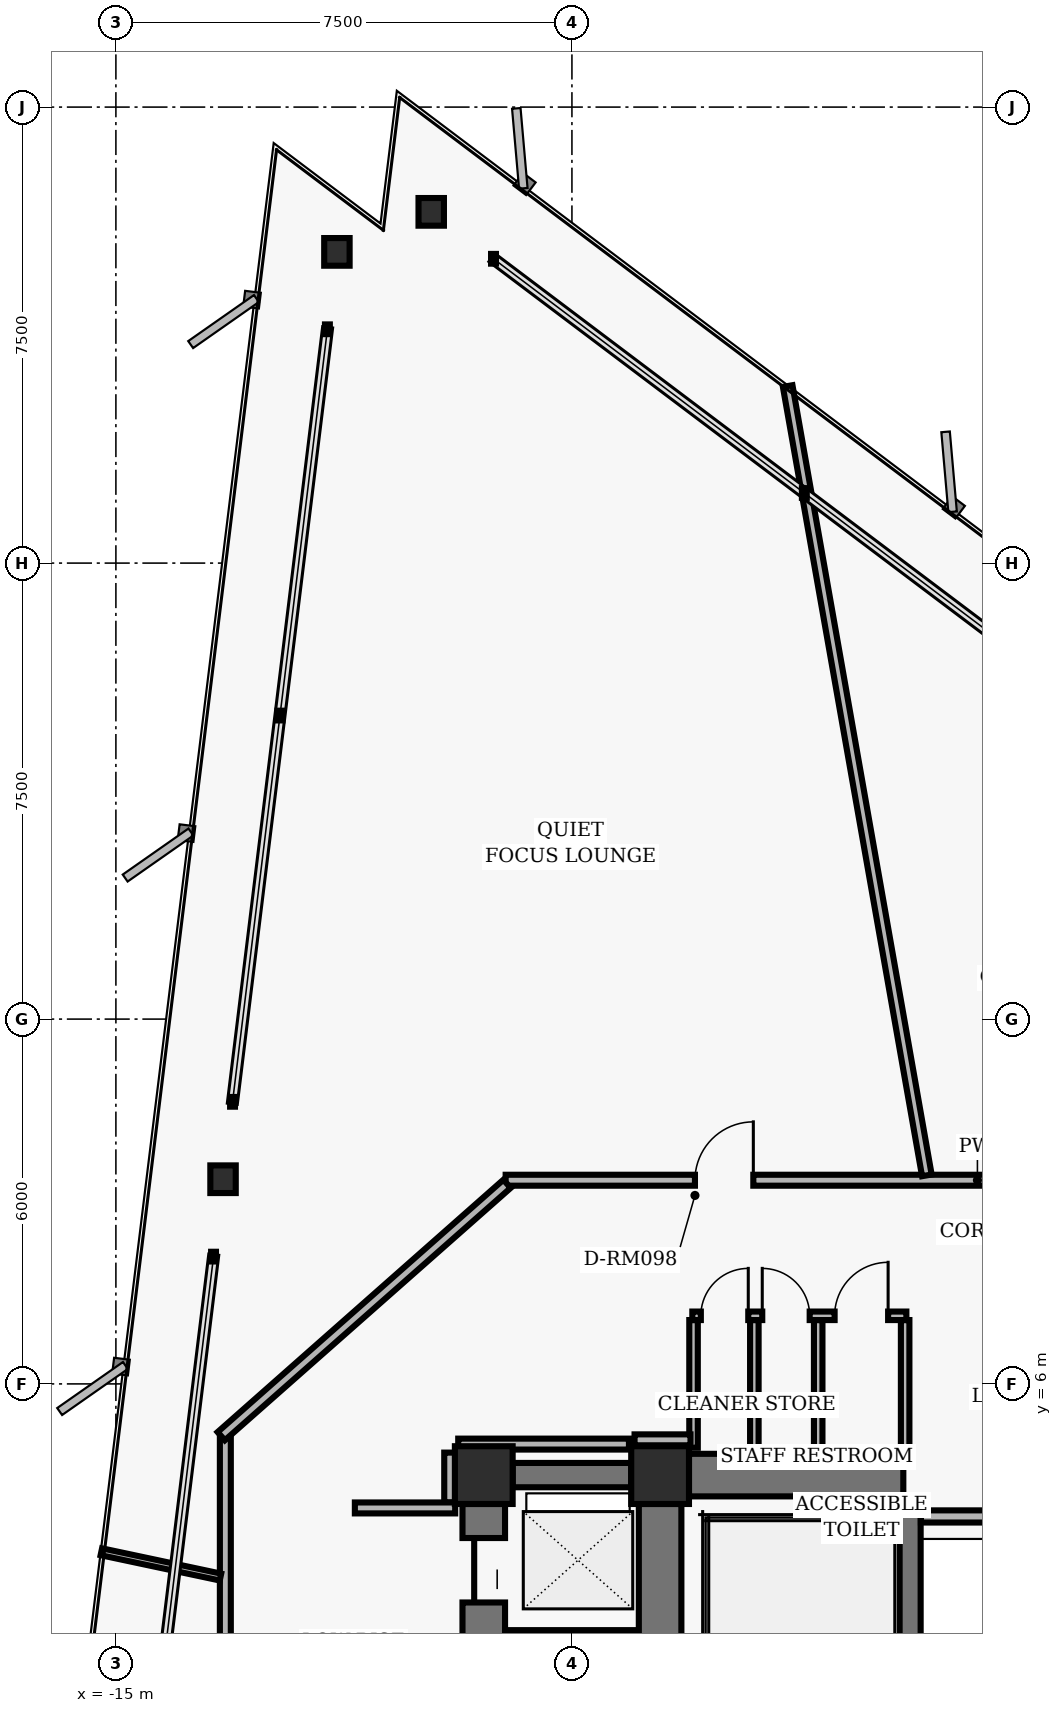
"""IFC4 building model, lengths in metres.
Left out: names, types, materials, properties, quantities, classifications, styles, units other than length and angle.
Written with IfcOpenShell. Run it as: python <this file> out.ifc"""

import sys

from ifc_helpers import new_model, si_unit, direction, frame, frame_2d, origin, origin_2d, place, context, subcontext, project, spatial, rectangle, hollow_rectangle, i_section, extrude, element, fill, save


model = new_model("IFC4")
c1 = context("Model", 3, precision=1e-05, world=origin(), true_north=direction((0.0, 1.0)))
c2 = subcontext(c1, "Body", "Model", "MODEL_VIEW")
j1 = project(units=[si_unit("LENGTHUNIT", "METRE"), si_unit("PLANEANGLEUNIT", "RADIAN")], contexts=[c1])
p1 = place(None, origin())
s1 = spatial("IfcSite", under=j1, at=p1, CompositionType="ELEMENT")
p2 = place(p1, origin())
s2 = spatial("IfcBuilding", under=s1, at=p2, CompositionType="ELEMENT")
p3 = place(p2, frame((0.0, 0.0, 69.76)))
s3 = spatial("IfcBuildingStorey", under=s2, at=p3, CompositionType="ELEMENT", Elevation=69.76)
for number, where, z_axis, x_axis in (
    (1, (-6.05, 4.5, 0.0), (0.0, 0.0, 1.0), (1.0, 0.0, 0.0)),
    (2, (-8.95, 4.5, 0.0), (0.0, 0.0, 1.0), (1.0, 0.0, 0.0)),
):
    element("IfcColumn", number, at=place(p3, frame(where, z_axis=z_axis, x_axis=x_axis)), inside=s3, PredefinedType="COLUMN", context=c2, shape_type="SweptSolid", body=[
        extrude(hollow_rectangle(XDim=0.95, YDim=0.95, WallThickness=0.06, InnerFilletRadius=0.02, OuterFilletRadius=0.04, at=origin_2d()), origin(), (0.0, 0.0, 1.0), 3.36),
    ])
p4 = place(p3, frame((-6.05, 0.475, 0.0), z_axis=(0.0, 0.0, 1.0), x_axis=(0.0, 1.0, 0.0)))
e3 = element("IfcWall", 3, at=p4, inside=s3, PredefinedType="SHEAR", context=c2, shape_type="SweptSolid", body=[
    extrude(rectangle(XDim=3.55, YDim=0.7, at=frame_2d((1.775, 0.0))), origin(), (0.0, 0.0, 1.0), 3.098),
])
p5 = place(p3, frame((-1.94, -4.1, 0.0), z_axis=(0.0, 0.0, 1.0), x_axis=(0.0, 1.0, 0.0)))
e4 = element("IfcWall", 4, at=p5, inside=s3, PredefinedType="SHEAR", context=c2, shape_type="SweptSolid", body=[
    extrude(rectangle(XDim=8.2, YDim=0.35, at=frame_2d((4.1, 0.0))), origin(), (0.0, 0.0, 1.0), 3.098),
])
p6 = place(p3, frame((-5.575, 4.5, 0.0), z_axis=(0.0, 0.0, 1.0), x_axis=(1.0, 0.0, 0.0)))
e5 = element("IfcWall", 5, at=p6, inside=s3, PredefinedType="SHEAR", context=c2, shape_type="SweptSolid", body=[
    extrude(rectangle(XDim=3.525, YDim=0.7, at=frame_2d((1.762, 0.0))), origin(), (0.0, 0.0, 1.0), 3.098),
])
p7 = place(p3, frame((-8.95, -3.825, 0.0), z_axis=(0.0, 0.0, 1.0), x_axis=(0.0, 1.0, 0.0)))
e6 = element("IfcWall", 6, at=p7, inside=s3, PredefinedType="SHEAR", context=c2, shape_type="SweptSolid", body=[
    extrude(rectangle(XDim=7.85, YDim=0.7, at=frame_2d((3.925, 0.0))), origin(), (0.0, 0.0, 1.0), 3.098),
])
p8 = place(p7, frame((0.55, 0.0, 0.0)))
e7 = element("IfcOpeningElement", 7, at=p8, cuts=e6, PredefinedType="OPENING", context=c2, shape_type="SweptSolid", body=[
    extrude(rectangle(XDim=1.06, YDim=2.04, at=frame_2d((0.53, 1.02))), frame((0.0, 0.36, 0.0), z_axis=(0.0, -1.0, 0.0), x_axis=(1.0, 0.0, 0.0)), (0.0, 0.0, 1.0), 0.72),
])
p9 = place(p7, frame((3.395, 0.0, 0.0)))
e8 = element("IfcOpeningElement", 8, at=p9, cuts=e6, PredefinedType="OPENING", context=c2, shape_type="SweptSolid", body=[
    extrude(rectangle(XDim=1.06, YDim=2.04, at=frame_2d((0.53, 1.02))), frame((0.0, 0.36, 0.0), z_axis=(0.0, -1.0, 0.0), x_axis=(1.0, 0.0, 0.0)), (0.0, 0.0, 1.0), 0.72),
])
p10 = place(p7, frame((6.23, 0.0, 0.0)))
e9 = element("IfcOpeningElement", 9, at=p10, cuts=e6, PredefinedType="OPENING", context=c2, shape_type="SweptSolid", body=[
    extrude(rectangle(XDim=1.06, YDim=2.04, at=frame_2d((0.53, 1.02))), frame((0.0, 0.36, 0.0), z_axis=(0.0, -1.0, 0.0), x_axis=(1.0, 0.0, 0.0)), (0.0, 0.0, 1.0), 0.72),
])
p11 = place(p3, frame((-8.475, 4.5, 0.0), z_axis=(0.0, 0.0, 1.0), x_axis=(1.0, 0.0, 0.0)))
e10 = element("IfcWall", 10, at=p11, inside=s3, PredefinedType="SHEAR", context=c2, shape_type="SweptSolid", body=[
    extrude(rectangle(XDim=1.95, YDim=0.4, at=frame_2d((0.975, 0.0))), origin(), (0.0, 0.0, 1.0), 3.098),
])
for number, where, z_axis, x_axis in (
    (11, (-9.814, 25.277, 0.0), (0.0, 0.0, 1.0), (1.0, 0.0, 0.0)),
    (12, (-11.365, 24.619, 0.0), (0.0, 0.0, 1.0), (1.0, 0.0, 0.0)),
    (13, (-13.238, 9.366, 0.0), (0.0, 0.0, 1.0), (1.0, 0.0, 0.0)),
):
    element("IfcColumn", number, at=place(p3, frame(where, z_axis=z_axis, x_axis=x_axis)), inside=s3, PredefinedType="COLUMN", context=c2, shape_type="SweptSolid", body=[
        extrude(i_section(OverallWidth=0.418, OverallDepth=0.455, WebThickness=0.042, FlangeThickness=0.068, FilletRadius=0.025, at=origin_2d()), origin(), (0.0, 0.0, 1.0), 3.36),
    ])
p12 = place(p3, frame((-1.76, 3.82, 0.0), z_axis=(0.0, 0.0, 1.0), x_axis=(1.0, 0.0, 0.0)))
e14 = element("IfcWall", 14, at=p12, inside=s3, PredefinedType="PARTITIONING", context=c2, shape_type="SweptSolid", body=[
    extrude(rectangle(XDim=3.52, YDim=0.2, at=frame_2d((1.76, 0.0))), origin(), (0.0, 0.0, 1.0), 3.073),
])
for number, where, z_axis, x_axis in (
    (15, (-5.5, 4.95, 0.0), (0.0, 0.0, 1.0), (0.0, 1.0, 0.0)),
    (16, (-4.5, 4.95, 0.0), (0.0, 0.0, 1.0), (0.0, 1.0, 0.0)),
    (17, (-3.45, 4.95, 0.0), (0.0, 0.0, 1.0), (0.0, 1.0, 0.0)),
    (18, (-2.02, 4.95, 0.0), (0.0, 0.0, 1.0), (0.0, 1.0, 0.0)),
):
    element("IfcWall", number, at=place(p3, frame(where, z_axis=z_axis, x_axis=x_axis)), inside=s3, PredefinedType="PARTITIONING", context=c2, shape_type="SweptSolid", body=[
        extrude(rectangle(XDim=2.1, YDim=0.14, at=frame_2d((1.05, 0.0))), origin(), (0.0, 0.0, 1.0), 3.073),
    ])
p13 = place(p3, frame((-5.52, 7.12, 0.0), z_axis=(0.0, 0.0, 1.0), x_axis=(1.0, 0.0, 0.0)))
e19 = element("IfcWall", 19, at=p13, inside=s3, PredefinedType="PARTITIONING", context=c2, shape_type="SweptSolid", body=[
    extrude(rectangle(XDim=3.52, YDim=0.14, at=frame_2d((1.76, 0.0))), origin(), (0.0, 0.0, 1.0), 3.073),
])
p14 = place(p13, frame((0.14, 0.0, 0.0)))
e20 = element("IfcOpeningElement", 20, at=p14, cuts=e19, PredefinedType="OPENING", context=c2, shape_type="SweptSolid", body=[
    extrude(rectangle(XDim=0.78, YDim=2.01, at=frame_2d((0.39, 1.005))), frame((0.0, 0.08, 0.0), z_axis=(0.0, -1.0, 0.0), x_axis=(1.0, 0.0, 0.0)), (0.0, 0.0, 1.0), 0.16),
])
p15 = place(p13, frame((1.15, 0.0, 0.0)))
e21 = element("IfcOpeningElement", 21, at=p15, cuts=e19, PredefinedType="OPENING", context=c2, shape_type="SweptSolid", body=[
    extrude(rectangle(XDim=0.78, YDim=2.01, at=frame_2d((0.39, 1.005))), frame((0.0, 0.08, 0.0), z_axis=(0.0, -1.0, 0.0), x_axis=(1.0, 0.0, 0.0)), (0.0, 0.0, 1.0), 0.16),
])
p16 = place(p13, frame((2.34, 0.0, 0.0)))
e22 = element("IfcOpeningElement", 22, at=p16, cuts=e19, PredefinedType="OPENING", context=c2, shape_type="SweptSolid", body=[
    extrude(rectangle(XDim=0.88, YDim=2.02, at=frame_2d((0.44, 1.01))), frame((0.0, 0.08, 0.0), z_axis=(0.0, -1.0, 0.0), x_axis=(1.0, 0.0, 0.0)), (0.0, 0.0, 1.0), 0.16),
])
p17 = place(p3, frame((-8.55, 1.85, 0.0), z_axis=(0.0, 0.0, 1.0), x_axis=(1.0, 0.0, 0.0)))
e23 = element("IfcWall", 23, at=p17, inside=s3, PredefinedType="PARTITIONING", context=c2, shape_type="SweptSolid", body=[
    extrude(rectangle(XDim=2.1, YDim=0.2, at=frame_2d((1.05, 0.0))), origin(), (0.0, 0.0, 1.0), 3.073),
])
p18 = place(p3, frame((-8.59, 9.35, 0.0), z_axis=(0.0, 0.0, 1.0), x_axis=(1.0, 0.0, 0.0)))
e24 = element("IfcWall", 24, at=p18, inside=s3, PredefinedType="PARTITIONING", context=c2, shape_type="SweptSolid", body=[
    extrude(rectangle(XDim=17.18, YDim=0.18, at=frame_2d((8.59, 0.0))), origin(), (0.0, 0.0, 1.0), 3.073),
])
p19 = place(p18, frame((11.444, 0.0, 0.0)))
e25 = element("IfcOpeningElement", 25, at=p19, cuts=e24, PredefinedType="OPENING", context=c2, shape_type="SweptSolid", body=[
    extrude(rectangle(XDim=0.96, YDim=2.02, at=frame_2d((0.48, 1.01))), frame((0.0, 0.1, 0.0), z_axis=(0.0, -1.0, 0.0), x_axis=(1.0, 0.0, 0.0)), (0.0, 0.0, 1.0), 0.2),
])
p20 = place(p18, frame((3.113, 0.0, 0.0)))
e26 = element("IfcOpeningElement", 26, at=p20, cuts=e24, PredefinedType="OPENING", context=c2, shape_type="SweptSolid", body=[
    extrude(rectangle(XDim=0.96, YDim=2.02, at=frame_2d((0.48, 1.01))), frame((0.0, 0.1, 0.0), z_axis=(0.0, -1.0, 0.0), x_axis=(1.0, 0.0, 0.0)), (0.0, 0.0, 1.0), 0.2),
])
p21 = place(p3, frame((-13.2, -5.11, 0.0), z_axis=(0.0, 0.0, 1.0), x_axis=(0.0, 1.0, 0.0)))
e27 = element("IfcWall", 27, at=p21, inside=s3, PredefinedType="PARTITIONING", context=c2, shape_type="SweptSolid", body=[
    extrude(rectangle(XDim=10.22, YDim=0.18, at=frame_2d((5.11, 0.0))), origin(), (0.0, 0.0, 1.0), 2.587),
])
p22 = place(p21, frame((3.616, 0.0, 0.0)))
e28 = element("IfcOpeningElement", 28, at=p22, cuts=e27, PredefinedType="OPENING", context=c2, shape_type="SweptSolid", body=[
    extrude(rectangle(XDim=0.96, YDim=2.02, at=frame_2d((0.48, 1.01))), frame((0.0, 0.1, 0.0), z_axis=(0.0, -1.0, 0.0), x_axis=(1.0, 0.0, 0.0)), (0.0, 0.0, 1.0), 0.2),
])
p23 = place(p3, frame((-13.268, 5.14, 0.0), z_axis=(0.0, 0.0, 1.0), x_axis=(0.749626463267, 0.66186113768, 0.0)))
e29 = element("IfcWall", 29, at=p23, inside=s3, PredefinedType="PARTITIONING", context=c2, shape_type="SweptSolid", body=[
    extrude(rectangle(XDim=6.27, YDim=0.18, at=frame_2d((3.135, 0.0))), origin(), (0.0, 0.0, 1.0), 3.073),
])
p24 = place(p3, frame((-9.51, 4.87, 0.0), z_axis=(0.0, 0.0, 1.0), x_axis=(0.0, -1.0, 0.0)))
e30 = element("IfcWall", 30, at=p24, inside=s3, PredefinedType="PARTITIONING", context=c2, shape_type="SweptSolid", body=[
    extrude(rectangle(XDim=0.82, YDim=0.18, at=frame_2d((0.41, 0.0))), origin(), (0.0, 0.0, 1.0), 3.073),
])
p25 = place(p3, frame((-9.42, 3.96, 0.0), z_axis=(0.0, 0.0, 1.0), x_axis=(-1.0, 0.0, 0.0)))
e31 = element("IfcWall", 31, at=p25, inside=s3, PredefinedType="PARTITIONING", context=c2, shape_type="SweptSolid", body=[
    extrude(rectangle(XDim=1.65, YDim=0.18, at=frame_2d((0.825, 0.0))), origin(), (0.0, 0.0, 1.0), 3.073),
])
p26 = place(p3, frame((-5.55, 5.08, 0.0), z_axis=(0.0, 0.0, 1.0), x_axis=(-1.0, 0.0, 0.0)))
e32 = element("IfcWall", 32, at=p26, inside=s3, PredefinedType="PARTITIONING", context=c2, shape_type="SweptSolid", body=[
    extrude(rectangle(XDim=0.92, YDim=0.18, at=frame_2d((0.46, 0.0))), origin(), (0.0, 0.0, 1.0), 3.073),
])
p27 = place(p3, frame((-6.562, 5.01, 0.0), z_axis=(0.0, 0.0, 1.0), x_axis=(-1.0, 0.0, 0.0)))
e33 = element("IfcWall", 33, at=p27, inside=s3, PredefinedType="PARTITIONING", context=c2, shape_type="SweptSolid", body=[
    extrude(rectangle(XDim=2.808, YDim=0.18, at=frame_2d((1.404, 0.0))), origin(), (0.0, 0.0, 1.0), 3.073),
])
p28 = place(p3, frame((-1.663, 9.43, 0.0), z_axis=(0.0, 0.0, 1.0), x_axis=(-0.17364798238, 0.984807787446, 0.0)))
e34 = element("IfcWall", 34, at=p28, inside=s3, PredefinedType="PARTITIONING", context=c2, shape_type="SweptSolid", body=[
    extrude(rectangle(XDim=13.182, YDim=0.16, at=frame_2d((6.591, 0.0))), origin(), (0.0, 0.0, 1.0), 3.073),
])
p29 = place(p3, frame((-13.28, 2.823, 0.0), z_axis=(0.0, 0.0, 1.0), x_axis=(-0.978147079353, 0.207914143705, 0.0)))
e35 = element("IfcWall", 35, at=p29, inside=s3, PredefinedType="MOVABLE", context=c2, shape_type="SweptSolid", body=[
    extrude(rectangle(XDim=2.003, YDim=0.115, at=frame_2d((1.001, 0.0))), origin(), (0.0, 0.0, 1.0), 3.073),
])
p30 = place(p14, origin())
e36 = element("IfcDoor", 36, at=p30, inside=s3, OperationType="SINGLE_SWING_RIGHT", PredefinedType="DOOR", context=c2, shape_type="SweptSolid", body=[
    extrude(rectangle(XDim=0.78, YDim=2.01, at=frame_2d((0.39, 1.005))), frame((0.0, 0.025, 0.0), z_axis=(0.0, -1.0, 0.0), x_axis=(1.0, 0.0, 0.0)), (0.0, 0.0, 1.0), 0.05),
])
fill(e20, e36)
p31 = place(p15, origin())
e37 = element("IfcDoor", 37, at=p31, inside=s3, OperationType="SINGLE_SWING_LEFT", PredefinedType="DOOR", context=c2, shape_type="SweptSolid", body=[
    extrude(rectangle(XDim=0.78, YDim=2.01, at=frame_2d((0.39, 1.005))), frame((0.0, 0.025, 0.0), z_axis=(0.0, -1.0, 0.0), x_axis=(1.0, 0.0, 0.0)), (0.0, 0.0, 1.0), 0.05),
])
fill(e21, e37)
p32 = place(p16, origin())
e38 = element("IfcDoor", 38, at=p32, inside=s3, OperationType="SINGLE_SWING_RIGHT", PredefinedType="DOOR", context=c2, shape_type="SweptSolid", body=[
    extrude(rectangle(XDim=0.88, YDim=2.02, at=frame_2d((0.44, 1.01))), frame((0.0, 0.025, 0.0), z_axis=(0.0, -1.0, 0.0), x_axis=(1.0, 0.0, 0.0)), (0.0, 0.0, 1.0), 0.05),
])
fill(e22, e38)
p33 = place(p10, origin())
e39 = element("IfcDoor", 39, at=p33, inside=s3, OperationType="SLIDING_TO_LEFT", PredefinedType="DOOR", context=c2, shape_type="SweptSolid", body=[
    extrude(rectangle(XDim=1.06, YDim=2.04, at=frame_2d((0.53, 1.02))), frame((0.0, 0.025, 0.0), z_axis=(0.0, -1.0, 0.0), x_axis=(1.0, 0.0, 0.0)), (0.0, 0.0, 1.0), 0.05),
])
fill(e9, e39)
p34 = place(p20, origin())
e40 = element("IfcDoor", 40, at=p34, inside=s3, OperationType="SINGLE_SWING_RIGHT", PredefinedType="DOOR", context=c2, shape_type="SweptSolid", body=[
    extrude(rectangle(XDim=0.96, YDim=2.02, at=frame_2d((0.48, 1.01))), frame((0.0, 0.025, 0.0), z_axis=(0.0, -1.0, 0.0), x_axis=(1.0, 0.0, 0.0)), (0.0, 0.0, 1.0), 0.05),
])
fill(e26, e40)
save(model, sys.argv[1])
